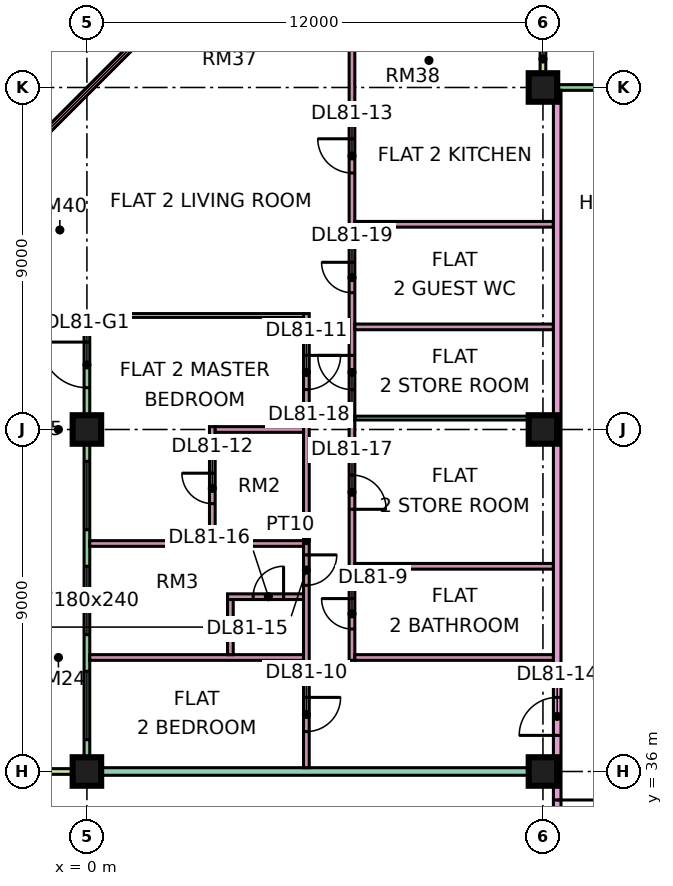
"""IFC4 building model, lengths in metres.
Left out: names, types, materials, properties, quantities, classifications, styles, units other than length and angle.
Written with IfcOpenShell. Run it as: python <this file> out.ifc"""

import sys

from ifc_helpers import new_model, si_unit, direction, frame, frame_2d, origin, origin_2d, place, context, subcontext, project, spatial, rectangle, extrude, element, fill, save


model = new_model("IFC4")
c1 = context("Model", 3, precision=1e-05, world=origin(), true_north=direction((0.0, 1.0)))
c2 = subcontext(c1, "Body", "Model", "MODEL_VIEW")
j1 = project(units=[si_unit("LENGTHUNIT", "METRE"), si_unit("PLANEANGLEUNIT", "RADIAN")], contexts=[c1])
p1 = place(None, origin())
s1 = spatial("IfcSite", under=j1, at=p1, CompositionType="ELEMENT")
p2 = place(p1, origin())
s2 = spatial("IfcBuilding", under=s1, at=p2, CompositionType="ELEMENT")
p3 = place(p2, frame((0.0, 0.0, 350.15)))
s3 = spatial("IfcBuildingStorey", under=s2, at=p3, CompositionType="ELEMENT", Elevation=350.15)
p4 = place(p3, frame((0.0, 36.0, 0.0), z_axis=(0.0, 0.0, 1.0), x_axis=(1.0, 0.0, 0.0)))
e1 = element("IfcColumn", 1, at=p4, inside=s3, PredefinedType="COLUMN", context=c2, shape_type="SweptSolid", body=[
    extrude(rectangle(XDim=0.75, YDim=0.75, at=origin_2d()), origin(), (0.0, 0.0, 1.0), 3.75),
])
for number, where, z_axis, x_axis in (
    (2, (0.0, 45.0, 0.0), (0.0, 0.0, 1.0), (1.0, 0.0, 0.0)),
    (3, (12.0, 36.0, 0.0), (0.0, 0.0, 1.0), (1.0, 0.0, 0.0)),
    (4, (12.0, 45.0, 0.0), (0.0, 0.0, 1.0), (1.0, 0.0, 0.0)),
    (5, (12.0, 54.0, 0.0), (0.0, 0.0, 1.0), (1.0, 0.0, 0.0)),
):
    element("IfcColumn", number, at=place(p3, frame(where, z_axis=z_axis, x_axis=x_axis)), inside=s3, PredefinedType="COLUMN", context=c2, shape_type="SweptSolid", body=[
        extrude(rectangle(XDim=0.75, YDim=0.75, at=origin_2d()), origin(), (0.0, 0.0, 1.0), 3.75),
    ])
p5 = place(p3, frame((22.425, 54.0, 0.0), z_axis=(0.0, 0.0, 1.0), x_axis=(-1.0, 0.0, 0.0)))
e6 = element("IfcWall", 6, at=p5, inside=s3, PredefinedType="SOLIDWALL", context=c2, shape_type="SweptSolid", body=[
    extrude(rectangle(XDim=10.35, YDim=0.15, at=frame_2d((5.175, 0.0))), origin(), (0.0, 0.0, 1.0), 3.35),
])
p6 = place(p5, frame((1.012, 0.0, 0.45)))
e7 = element("IfcOpeningElement", 7, at=p6, cuts=e6, PredefinedType="OPENING", context=c2, shape_type="SweptSolid", body=[
    extrude(rectangle(XDim=4.8, YDim=2.4, at=frame_2d((2.4, 1.2))), frame((0.0, 0.085, 0.0), z_axis=(0.0, -1.0, 0.0), x_axis=(1.0, 0.0, 0.0)), (0.0, 0.0, 1.0), 0.17),
])
p7 = place(p3, frame((12.0, 55.5, 0.0), z_axis=(0.0, 0.0, 1.0), x_axis=(0.0, -1.0, 0.0)))
e8 = element("IfcWall", 8, at=p7, inside=s3, PredefinedType="SOLIDWALL", context=c2, shape_type="SweptSolid", body=[
    extrude(rectangle(XDim=1.5, YDim=0.15, at=frame_2d((0.75, 0.0))), origin(), (0.0, 0.0, 1.0), 3.35),
])
p8 = place(p3, frame((1.553, 55.447, 0.0), z_axis=(0.0, 0.0, 1.0), x_axis=(-0.707106781187, -0.707106781187, 0.0)))
e9 = element("IfcWall", 9, at=p8, inside=s3, PredefinedType="SOLIDWALL", context=c2, shape_type="SweptSolid", body=[
    extrude(rectangle(XDim=4.243, YDim=0.15, at=frame_2d((2.121, 0.0))), origin(), (0.0, 0.0, 1.0), 3.35),
])
p9 = place(p8, frame((0.621, 0.0, 0.45)))
e10 = element("IfcOpeningElement", 10, at=p9, cuts=e9, PredefinedType="OPENING", context=c2, shape_type="SweptSolid", body=[
    extrude(rectangle(XDim=3.0, YDim=2.4, at=frame_2d((1.5, 1.2))), frame((0.0, 0.085, 0.0), z_axis=(0.0, -1.0, 0.0), x_axis=(1.0, 0.0, 0.0)), (0.0, 0.0, 1.0), 0.17),
])
p10 = place(p3, frame((0.0, 47.925, 0.0), z_axis=(0.0, 0.0, 1.0), x_axis=(0.0, -1.0, 0.0)))
e11 = element("IfcWall", 11, at=p10, inside=s3, PredefinedType="SOLIDWALL", context=c2, shape_type="SweptSolid", body=[
    extrude(rectangle(XDim=11.85, YDim=0.15, at=frame_2d((5.925, 0.0))), origin(), (0.0, 0.0, 1.0), 3.35),
])
p11 = place(p10, frame((0.625, 0.0, 0.0)))
e12 = element("IfcOpeningElement", 12, at=p11, cuts=e11, PredefinedType="OPENING", context=c2, shape_type="SweptSolid", body=[
    extrude(rectangle(XDim=1.2, YDim=2.4, at=frame_2d((0.6, 1.2))), frame((0.0, 0.085, 0.0), z_axis=(0.0, -1.0, 0.0), x_axis=(1.0, 0.0, 0.0)), (0.0, 0.0, 1.0), 0.17),
])
p12 = place(p10, frame((3.762, 0.0, 0.45)))
e13 = element("IfcOpeningElement", 13, at=p12, cuts=e11, PredefinedType="OPENING", context=c2, shape_type="SweptSolid", body=[
    extrude(rectangle(XDim=1.8, YDim=2.4, at=frame_2d((0.9, 1.2))), frame((0.0, 0.085, 0.0), z_axis=(0.0, -1.0, 0.0), x_axis=(1.0, 0.0, 0.0)), (0.0, 0.0, 1.0), 0.17),
])
p13 = place(p10, frame((6.525, 0.0, 0.45)))
e14 = element("IfcOpeningElement", 14, at=p13, cuts=e11, PredefinedType="OPENING", context=c2, shape_type="SweptSolid", body=[
    extrude(rectangle(XDim=1.8, YDim=2.4, at=frame_2d((0.9, 1.2))), frame((0.0, 0.085, 0.0), z_axis=(0.0, -1.0, 0.0), x_axis=(1.0, 0.0, 0.0)), (0.0, 0.0, 1.0), 0.17),
])
p14 = place(p10, frame((9.288, 0.0, 0.45)))
e15 = element("IfcOpeningElement", 15, at=p14, cuts=e11, PredefinedType="OPENING", context=c2, shape_type="SweptSolid", body=[
    extrude(rectangle(XDim=1.8, YDim=2.4, at=frame_2d((0.9, 1.2))), frame((0.0, 0.085, 0.0), z_axis=(0.0, -1.0, 0.0), x_axis=(1.0, 0.0, 0.0)), (0.0, 0.0, 1.0), 0.17),
])
for number, where, z_axis, x_axis in (
    (16, (-1.5, 48.0, 0.0), (0.0, 0.0, 1.0), (1.0, 0.0, 0.0)),
    (17, (-1.5, 36.0, 0.0), (0.0, 0.0, 1.0), (1.0, 0.0, 0.0)),
):
    element("IfcWall", number, at=place(p3, frame(where, z_axis=z_axis, x_axis=x_axis)), inside=s3, PredefinedType="SOLIDWALL", context=c2, shape_type="SweptSolid", body=[
        extrude(rectangle(XDim=1.5, YDim=0.15, at=frame_2d((0.75, 0.0))), origin(), (0.0, 0.0, 1.0), 3.35),
    ])
e18 = element("IfcWall", 18, at=p4, inside=s3, PredefinedType="PARTITIONING", context=c2, shape_type="SweptSolid", body=[
    extrude(rectangle(XDim=12.275, YDim=0.2, at=frame_2d((6.137, 0.0))), origin(), (0.0, 0.0, 1.0), 3.35),
])
p15 = place(p3, frame((0.0, 48.0, 0.0), z_axis=(0.0, 0.0, 1.0), x_axis=(1.0, 0.0, 0.0)))
e19 = element("IfcWall", 19, at=p15, inside=s3, PredefinedType="PARTITIONING", context=c2, shape_type="SweptSolid", body=[
    extrude(rectangle(XDim=5.7, YDim=0.1, at=frame_2d((2.85, 0.0))), origin(), (0.0, 0.0, 1.0), 3.35),
])
for number, where, z_axis, x_axis in (
    (20, (0.074, 39.0, 0.0), (0.0, 0.0, 1.0), (1.0, 0.0, 0.0)),
    (21, (0.074, 42.0, 0.0), (0.0, 0.0, 1.0), (1.0, 0.0, 0.0)),
):
    element("IfcWall", number, at=place(p3, frame(where, z_axis=z_axis, x_axis=x_axis)), inside=s3, PredefinedType="PARTITIONING", context=c2, shape_type="SweptSolid", body=[
        extrude(rectangle(XDim=5.626, YDim=0.15, at=frame_2d((2.813, 0.0))), origin(), (0.0, 0.0, 1.0), 3.35),
    ])
p16 = place(p3, frame((3.3, 42.075, 0.0), z_axis=(0.0, 0.0, 1.0), x_axis=(0.0, 1.0, 0.0)))
e22 = element("IfcWall", 22, at=p16, inside=s3, PredefinedType="PARTITIONING", context=c2, shape_type="SweptSolid", body=[
    extrude(rectangle(XDim=3.0, YDim=0.15, at=frame_2d((1.5, 0.0))), origin(), (0.0, 0.0, 1.0), 3.35),
])
p17 = place(p16, frame((0.975, 0.0, 0.0)))
e23 = element("IfcOpeningElement", 23, at=p17, cuts=e22, PredefinedType="OPENING", context=c2, shape_type="SweptSolid", body=[
    extrude(rectangle(XDim=0.8, YDim=2.1, at=frame_2d((0.4, 1.05))), frame((0.0, 0.085, 0.0), z_axis=(0.0, -1.0, 0.0), x_axis=(1.0, 0.0, 0.0)), (0.0, 0.0, 1.0), 0.17),
])
p18 = place(p3, frame((3.375, 45.0, 0.0), z_axis=(0.0, 0.0, 1.0), x_axis=(1.0, 0.0, 0.0)))
e24 = element("IfcWall", 24, at=p18, inside=s3, PredefinedType="PARTITIONING", context=c2, shape_type="SweptSolid", body=[
    extrude(rectangle(XDim=2.325, YDim=0.15, at=frame_2d((1.163, 0.0))), origin(), (0.0, 0.0, 1.0), 3.35),
])
p19 = place(p3, frame((3.7, 40.6, 0.0), z_axis=(0.0, 0.0, 1.0), x_axis=(1.0, 0.0, 0.0)))
e25 = element("IfcWall", 25, at=p19, inside=s3, PredefinedType="PARTITIONING", context=c2, shape_type="SweptSolid", body=[
    extrude(rectangle(XDim=2.0, YDim=0.15, at=frame_2d((1.0, 0.0))), origin(), (0.0, 0.0, 1.0), 3.35),
])
p20 = place(p19, frame((0.675, 0.0, 0.0)))
e26 = element("IfcOpeningElement", 26, at=p20, cuts=e25, PredefinedType="OPENING", context=c2, shape_type="SweptSolid", body=[
    extrude(rectangle(XDim=0.8, YDim=2.1, at=frame_2d((0.4, 1.05))), frame((0.0, 0.085, 0.0), z_axis=(0.0, -1.0, 0.0), x_axis=(1.0, 0.0, 0.0)), (0.0, 0.0, 1.0), 0.17),
])
p21 = place(p3, frame((3.775, 39.075, 0.0), z_axis=(0.0, 0.0, 1.0), x_axis=(0.0, 1.0, 0.0)))
e27 = element("IfcWall", 27, at=p21, inside=s3, PredefinedType="PARTITIONING", context=c2, shape_type="SweptSolid", body=[
    extrude(rectangle(XDim=1.45, YDim=0.15, at=frame_2d((0.725, 0.0))), origin(), (0.0, 0.0, 1.0), 3.35),
])
p22 = place(p3, frame((5.775, 36.1, 0.0), z_axis=(0.0, 0.0, 1.0), x_axis=(0.0, 1.0, 0.0)))
e28 = element("IfcWall", 28, at=p22, inside=s3, PredefinedType="PARTITIONING", context=c2, shape_type="SweptSolid", body=[
    extrude(rectangle(XDim=11.95, YDim=0.15, at=frame_2d((5.975, 0.0))), origin(), (0.0, 0.0, 1.0), 3.35),
])
p23 = place(p22, frame((0.95, 0.0, 0.0)))
e29 = element("IfcOpeningElement", 29, at=p23, cuts=e28, PredefinedType="OPENING", context=c2, shape_type="SweptSolid", body=[
    extrude(rectangle(XDim=0.9, YDim=2.1, at=frame_2d((0.45, 1.05))), frame((0.0, 0.085, 0.0), z_axis=(0.0, -1.0, 0.0), x_axis=(1.0, 0.0, 0.0)), (0.0, 0.0, 1.0), 0.17),
])
p24 = place(p22, frame((9.95, 0.0, 0.0)))
e30 = element("IfcOpeningElement", 30, at=p24, cuts=e28, PredefinedType="OPENING", context=c2, shape_type="SweptSolid", body=[
    extrude(rectangle(XDim=0.9, YDim=2.1, at=frame_2d((0.45, 1.05))), frame((0.0, 0.085, 0.0), z_axis=(0.0, -1.0, 0.0), x_axis=(1.0, 0.0, 0.0)), (0.0, 0.0, 1.0), 0.17),
])
p25 = place(p22, frame((4.8, 0.0, 0.0)))
e31 = element("IfcOpeningElement", 31, at=p25, cuts=e28, PredefinedType="OPENING", context=c2, shape_type="SweptSolid", body=[
    extrude(rectangle(XDim=0.8, YDim=2.1, at=frame_2d((0.4, 1.05))), frame((0.0, 0.085, 0.0), z_axis=(0.0, -1.0, 0.0), x_axis=(1.0, 0.0, 0.0)), (0.0, 0.0, 1.0), 0.17),
])
p26 = place(p3, frame((6.975, 38.925, 0.0), z_axis=(0.0, 0.0, 1.0), x_axis=(0.0, 1.0, 0.0)))
e32 = element("IfcWall", 32, at=p26, inside=s3, PredefinedType="PARTITIONING", context=c2, shape_type="SweptSolid", body=[
    extrude(rectangle(XDim=16.425, YDim=0.15, at=frame_2d((8.212, 0.0))), origin(), (0.0, 0.0, 1.0), 3.35),
])
p27 = place(p26, frame((0.825, 0.0, 0.0)))
e33 = element("IfcOpeningElement", 33, at=p27, cuts=e32, PredefinedType="OPENING", context=c2, shape_type="SweptSolid", body=[
    extrude(rectangle(XDim=0.8, YDim=2.1, at=frame_2d((0.4, 1.05))), frame((0.0, 0.085, 0.0), z_axis=(0.0, -1.0, 0.0), x_axis=(1.0, 0.0, 0.0)), (0.0, 0.0, 1.0), 0.17),
])
p28 = place(p26, frame((12.825, 0.0, 0.0)))
e34 = element("IfcOpeningElement", 34, at=p28, cuts=e32, PredefinedType="OPENING", context=c2, shape_type="SweptSolid", body=[
    extrude(rectangle(XDim=0.9, YDim=2.1, at=frame_2d((0.45, 1.05))), frame((0.0, 0.085, 0.0), z_axis=(0.0, -1.0, 0.0), x_axis=(1.0, 0.0, 0.0)), (0.0, 0.0, 1.0), 0.17),
])
p29 = place(p26, frame((3.975, 0.0, 0.0)))
e35 = element("IfcOpeningElement", 35, at=p29, cuts=e32, PredefinedType="OPENING", context=c2, shape_type="SweptSolid", body=[
    extrude(rectangle(XDim=0.9, YDim=2.1, at=frame_2d((0.45, 1.05))), frame((0.0, 0.085, 0.0), z_axis=(0.0, -1.0, 0.0), x_axis=(1.0, 0.0, 0.0)), (0.0, 0.0, 1.0), 0.17),
])
p30 = place(p26, frame((7.125, 0.0, 0.0)))
e36 = element("IfcOpeningElement", 36, at=p30, cuts=e32, PredefinedType="OPENING", context=c2, shape_type="SweptSolid", body=[
    extrude(rectangle(XDim=0.9, YDim=2.1, at=frame_2d((0.45, 1.05))), frame((0.0, 0.085, 0.0), z_axis=(0.0, -1.0, 0.0), x_axis=(1.0, 0.0, 0.0)), (0.0, 0.0, 1.0), 0.17),
])
p31 = place(p26, frame((9.675, 0.0, 0.0)))
e37 = element("IfcOpeningElement", 37, at=p31, cuts=e32, PredefinedType="OPENING", context=c2, shape_type="SweptSolid", body=[
    extrude(rectangle(XDim=0.8, YDim=2.1, at=frame_2d((0.4, 1.05))), frame((0.0, 0.085, 0.0), z_axis=(0.0, -1.0, 0.0), x_axis=(1.0, 0.0, 0.0)), (0.0, 0.0, 1.0), 0.17),
])
for number, where, z_axis, x_axis in (
    (38, (7.05, 39.0, 0.0), (0.0, 0.0, 1.0), (1.0, 0.0, 0.0)),
    (39, (7.05, 41.4, 0.0), (0.0, 0.0, 1.0), (1.0, 0.0, 0.0)),
):
    element("IfcWall", number, at=place(p3, frame(where, z_axis=z_axis, x_axis=x_axis)), inside=s3, PredefinedType="PARTITIONING", context=c2, shape_type="SweptSolid", body=[
        extrude(rectangle(XDim=5.225, YDim=0.15, at=frame_2d((2.612, 0.0))), origin(), (0.0, 0.0, 1.0), 3.35),
    ])
p32 = place(p3, frame((7.05, 45.3, 0.0), z_axis=(0.0, 0.0, 1.0), x_axis=(1.0, 0.0, 0.0)))
e40 = element("IfcWall", 40, at=p32, inside=s3, PredefinedType="PARTITIONING", context=c2, shape_type="SweptSolid", body=[
    extrude(rectangle(XDim=5.225, YDim=0.1, at=frame_2d((2.612, 0.0))), origin(), (0.0, 0.0, 1.0), 3.35),
])
for number, where, z_axis, x_axis in (
    (41, (7.05, 47.7, 0.0), (0.0, 0.0, 1.0), (1.0, 0.0, 0.0)),
    (42, (7.05, 50.4, 0.0), (0.0, 0.0, 1.0), (1.0, 0.0, 0.0)),
):
    element("IfcWall", number, at=place(p3, frame(where, z_axis=z_axis, x_axis=x_axis)), inside=s3, PredefinedType="PARTITIONING", context=c2, shape_type="SweptSolid", body=[
        extrude(rectangle(XDim=5.225, YDim=0.15, at=frame_2d((2.612, 0.0))), origin(), (0.0, 0.0, 1.0), 3.35),
    ])
p33 = place(p3, frame((12.375, 20.0, 0.0), z_axis=(0.0, 0.0, 1.0), x_axis=(0.0, 1.0, 0.0)))
e43 = element("IfcWall", 43, at=p33, inside=s3, PredefinedType="PARTITIONING", context=c2, shape_type="SweptSolid", body=[
    extrude(rectangle(XDim=33.926, YDim=0.2, at=frame_2d((16.963, 0.0))), origin(), (0.0, 0.0, 1.0), 3.35),
])
p34 = place(p33, frame((16.95, 0.0, 0.0)))
e44 = element("IfcOpeningElement", 44, at=p34, cuts=e43, PredefinedType="OPENING", context=c2, shape_type="SweptSolid", body=[
    extrude(rectangle(XDim=1.0, YDim=2.1, at=frame_2d((0.5, 1.05))), frame((0.0, 0.11, 0.0), z_axis=(0.0, -1.0, 0.0), x_axis=(1.0, 0.0, 0.0)), (0.0, 0.0, 1.0), 0.22),
])
p35 = place(p33, frame((0.6, 0.0, 0.0)))
e45 = element("IfcOpeningElement", 45, at=p35, cuts=e43, PredefinedType="OPENING", context=c2, shape_type="SweptSolid", body=[
    extrude(rectangle(XDim=1.2, YDim=2.1, at=frame_2d((0.6, 1.05))), frame((0.0, 0.11, 0.0), z_axis=(0.0, -1.0, 0.0), x_axis=(1.0, 0.0, 0.0)), (0.0, 0.0, 1.0), 0.22),
])
p36 = place(p33, frame((14.25, 0.0, 0.0)))
e46 = element("IfcOpeningElement", 46, at=p36, cuts=e43, PredefinedType="OPENING", context=c2, shape_type="SweptSolid", body=[
    extrude(rectangle(XDim=1.0, YDim=2.1, at=frame_2d((0.5, 1.05))), frame((0.0, 0.11, 0.0), z_axis=(0.0, -1.0, 0.0), x_axis=(1.0, 0.0, 0.0)), (0.0, 0.0, 1.0), 0.22),
])
p37 = place(p9, origin())
e47 = element("IfcWindow", 47, at=p37, inside=s3, PartitioningType="SINGLE_PANEL", PredefinedType="WINDOW", context=c2, shape_type="SweptSolid", body=[
    extrude(rectangle(XDim=3.0, YDim=2.4, at=frame_2d((1.5, 1.2))), frame((0.0, 0.03, 0.0), z_axis=(0.0, -1.0, 0.0), x_axis=(1.0, 0.0, 0.0)), (0.0, 0.0, 1.0), 0.06),
])
fill(e10, e47)
p38 = place(p11, frame((1.2, 0.0, 0.0), z_axis=(0.0, 0.0, 1.0), x_axis=(-1.0, 0.0, 0.0)))
e48 = element("IfcDoor", 48, at=p38, inside=s3, OperationType="DOUBLE_DOOR_SINGLE_SWING", PredefinedType="DOOR", context=c2, shape_type="SweptSolid", body=[
    extrude(rectangle(XDim=1.2, YDim=2.4, at=frame_2d((0.6, 1.2))), frame((0.0, 0.025, 0.0), z_axis=(0.0, -1.0, 0.0), x_axis=(1.0, 0.0, 0.0)), (0.0, 0.0, 1.0), 0.05),
])
fill(e12, e48)
p39 = place(p12, origin())
e49 = element("IfcWindow", 49, at=p39, inside=s3, PartitioningType="SINGLE_PANEL", PredefinedType="WINDOW", context=c2, shape_type="SweptSolid", body=[
    extrude(rectangle(XDim=1.8, YDim=2.4, at=frame_2d((0.9, 1.2))), frame((0.0, 0.03, 0.0), z_axis=(0.0, -1.0, 0.0), x_axis=(1.0, 0.0, 0.0)), (0.0, 0.0, 1.0), 0.06),
])
fill(e13, e49)
p40 = place(p13, origin())
e50 = element("IfcWindow", 50, at=p40, inside=s3, PartitioningType="SINGLE_PANEL", PredefinedType="WINDOW", context=c2, shape_type="SweptSolid", body=[
    extrude(rectangle(XDim=1.8, YDim=2.4, at=frame_2d((0.9, 1.2))), frame((0.0, 0.03, 0.0), z_axis=(0.0, -1.0, 0.0), x_axis=(1.0, 0.0, 0.0)), (0.0, 0.0, 1.0), 0.06),
])
fill(e14, e50)
p41 = place(p14, origin())
e51 = element("IfcWindow", 51, at=p41, inside=s3, PartitioningType="SINGLE_PANEL", PredefinedType="WINDOW", context=c2, shape_type="SweptSolid", body=[
    extrude(rectangle(XDim=1.8, YDim=2.4, at=frame_2d((0.9, 1.2))), frame((0.0, 0.03, 0.0), z_axis=(0.0, -1.0, 0.0), x_axis=(1.0, 0.0, 0.0)), (0.0, 0.0, 1.0), 0.06),
])
fill(e15, e51)
p42 = place(p27, frame((0.8, 0.0, 0.0), z_axis=(0.0, 0.0, 1.0), x_axis=(-1.0, 0.0, 0.0)))
e52 = element("IfcDoor", 52, at=p42, inside=s3, OperationType="SINGLE_SWING_RIGHT", PredefinedType="DOOR", context=c2, shape_type="SweptSolid", body=[
    extrude(rectangle(XDim=0.8, YDim=2.1, at=frame_2d((0.4, 1.05))), frame((0.0, 0.025, 0.0), z_axis=(0.0, -1.0, 0.0), x_axis=(1.0, 0.0, 0.0)), (0.0, 0.0, 1.0), 0.05),
])
fill(e33, e52)
p43 = place(p23, origin())
e53 = element("IfcDoor", 53, at=p43, inside=s3, OperationType="SINGLE_SWING_RIGHT", PredefinedType="DOOR", context=c2, shape_type="SweptSolid", body=[
    extrude(rectangle(XDim=0.9, YDim=2.1, at=frame_2d((0.45, 1.05))), frame((0.0, 0.025, 0.0), z_axis=(0.0, -1.0, 0.0), x_axis=(1.0, 0.0, 0.0)), (0.0, 0.0, 1.0), 0.05),
])
fill(e29, e53)
p44 = place(p24, origin())
e54 = element("IfcDoor", 54, at=p44, inside=s3, OperationType="SINGLE_SWING_RIGHT", PredefinedType="DOOR", context=c2, shape_type="SweptSolid", body=[
    extrude(rectangle(XDim=0.9, YDim=2.1, at=frame_2d((0.45, 1.05))), frame((0.0, 0.025, 0.0), z_axis=(0.0, -1.0, 0.0), x_axis=(1.0, 0.0, 0.0)), (0.0, 0.0, 1.0), 0.05),
])
fill(e30, e54)
p45 = place(p17, frame((0.8, 0.0, 0.0), z_axis=(0.0, 0.0, 1.0), x_axis=(-1.0, 0.0, 0.0)))
e55 = element("IfcDoor", 55, at=p45, inside=s3, OperationType="SINGLE_SWING_RIGHT", PredefinedType="DOOR", context=c2, shape_type="SweptSolid", body=[
    extrude(rectangle(XDim=0.8, YDim=2.1, at=frame_2d((0.4, 1.05))), frame((0.0, 0.025, 0.0), z_axis=(0.0, -1.0, 0.0), x_axis=(1.0, 0.0, 0.0)), (0.0, 0.0, 1.0), 0.05),
])
fill(e23, e55)
p46 = place(p28, frame((0.9, 0.0, 0.0), z_axis=(0.0, 0.0, 1.0), x_axis=(-1.0, 0.0, 0.0)))
e56 = element("IfcDoor", 56, at=p46, inside=s3, OperationType="SINGLE_SWING_RIGHT", PredefinedType="DOOR", context=c2, shape_type="SweptSolid", body=[
    extrude(rectangle(XDim=0.9, YDim=2.1, at=frame_2d((0.45, 1.05))), frame((0.0, 0.025, 0.0), z_axis=(0.0, -1.0, 0.0), x_axis=(1.0, 0.0, 0.0)), (0.0, 0.0, 1.0), 0.05),
])
fill(e34, e56)
p47 = place(p34, origin())
e57 = element("IfcDoor", 57, at=p47, inside=s3, OperationType="SINGLE_SWING_LEFT", PredefinedType="DOOR", context=c2, shape_type="SweptSolid", body=[
    extrude(rectangle(XDim=1.0, YDim=2.1, at=frame_2d((0.5, 1.05))), frame((0.0, 0.025, 0.0), z_axis=(0.0, -1.0, 0.0), x_axis=(1.0, 0.0, 0.0)), (0.0, 0.0, 1.0), 0.05),
])
fill(e44, e57)
p48 = place(p25, origin())
e58 = element("IfcDoor", 58, at=p48, inside=s3, OperationType="SINGLE_SWING_RIGHT", PredefinedType="DOOR", context=c2, shape_type="SweptSolid", body=[
    extrude(rectangle(XDim=0.8, YDim=2.1, at=frame_2d((0.4, 1.05))), frame((0.0, 0.025, 0.0), z_axis=(0.0, -1.0, 0.0), x_axis=(1.0, 0.0, 0.0)), (0.0, 0.0, 1.0), 0.05),
])
fill(e31, e58)
p49 = place(p20, frame((0.8, 0.0, 0.0), z_axis=(0.0, 0.0, 1.0), x_axis=(-1.0, 0.0, 0.0)))
e59 = element("IfcDoor", 59, at=p49, inside=s3, OperationType="SINGLE_SWING_RIGHT", PredefinedType="DOOR", context=c2, shape_type="SweptSolid", body=[
    extrude(rectangle(XDim=0.8, YDim=2.1, at=frame_2d((0.4, 1.05))), frame((0.0, 0.025, 0.0), z_axis=(0.0, -1.0, 0.0), x_axis=(1.0, 0.0, 0.0)), (0.0, 0.0, 1.0), 0.05),
])
fill(e26, e59)
p50 = place(p29, frame((0.9, 0.0, 0.0), z_axis=(0.0, 0.0, 1.0), x_axis=(-1.0, 0.0, 0.0)))
e60 = element("IfcDoor", 60, at=p50, inside=s3, OperationType="SINGLE_SWING_LEFT", PredefinedType="DOOR", context=c2, shape_type="SweptSolid", body=[
    extrude(rectangle(XDim=0.9, YDim=2.1, at=frame_2d((0.45, 1.05))), frame((0.0, 0.025, 0.0), z_axis=(0.0, -1.0, 0.0), x_axis=(1.0, 0.0, 0.0)), (0.0, 0.0, 1.0), 0.05),
])
fill(e35, e60)
p51 = place(p30, frame((0.9, 0.0, 0.0), z_axis=(0.0, 0.0, 1.0), x_axis=(-1.0, 0.0, 0.0)))
e61 = element("IfcDoor", 61, at=p51, inside=s3, OperationType="SINGLE_SWING_RIGHT", PredefinedType="DOOR", context=c2, shape_type="SweptSolid", body=[
    extrude(rectangle(XDim=0.9, YDim=2.1, at=frame_2d((0.45, 1.05))), frame((0.0, 0.025, 0.0), z_axis=(0.0, -1.0, 0.0), x_axis=(1.0, 0.0, 0.0)), (0.0, 0.0, 1.0), 0.05),
])
fill(e36, e61)
p52 = place(p31, frame((0.8, 0.0, 0.0), z_axis=(0.0, 0.0, 1.0), x_axis=(-1.0, 0.0, 0.0)))
e62 = element("IfcDoor", 62, at=p52, inside=s3, OperationType="SINGLE_SWING_RIGHT", PredefinedType="DOOR", context=c2, shape_type="SweptSolid", body=[
    extrude(rectangle(XDim=0.8, YDim=2.1, at=frame_2d((0.4, 1.05))), frame((0.0, 0.025, 0.0), z_axis=(0.0, -1.0, 0.0), x_axis=(1.0, 0.0, 0.0)), (0.0, 0.0, 1.0), 0.05),
])
fill(e37, e62)
p53 = place(p36, origin())
e63 = element("IfcDoor", 63, at=p53, inside=s3, OperationType="SINGLE_SWING_RIGHT", PredefinedType="DOOR", context=c2, shape_type="SweptSolid", body=[
    extrude(rectangle(XDim=1.0, YDim=2.1, at=frame_2d((0.5, 1.05))), frame((0.0, 0.025, 0.0), z_axis=(0.0, -1.0, 0.0), x_axis=(1.0, 0.0, 0.0)), (0.0, 0.0, 1.0), 0.05),
])
fill(e46, e63)
save(model, sys.argv[1])
